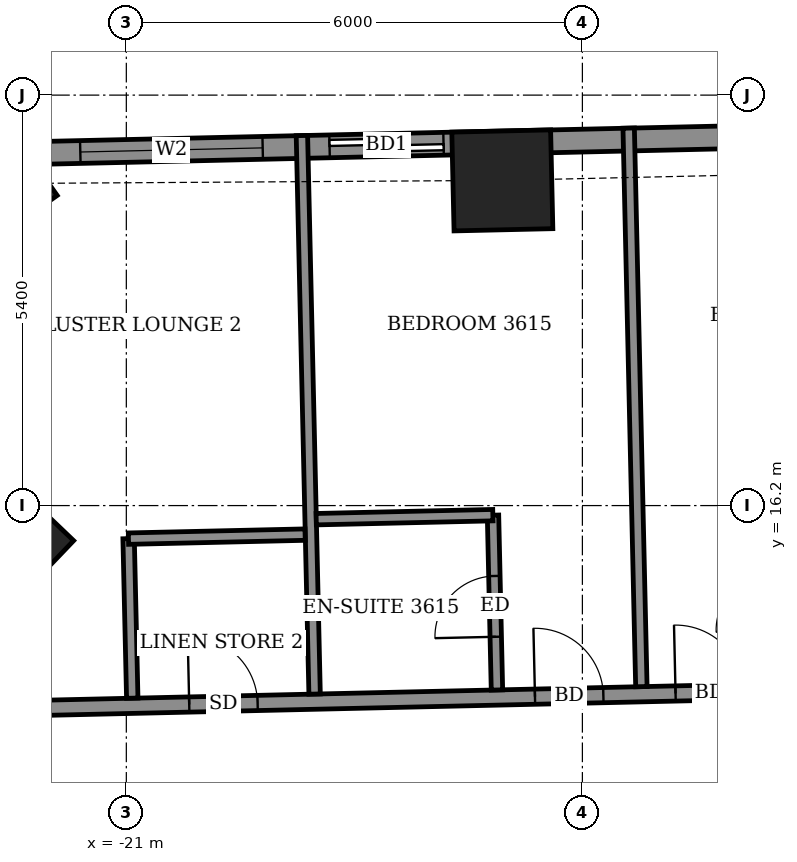
"""IFC4 building model, lengths in metres.
Left out: names, types, materials, properties, quantities, classifications, styles, units other than length and angle.
Written with IfcOpenShell. Run it as: python <this file> out.ifc"""

import sys

from ifc_helpers import new_model, si_unit, direction, frame, frame_2d, origin, origin_2d, place, context, subcontext, project, spatial, rectangle, extrude, element, fill, save


model = new_model("IFC4")
c1 = context("Model", 3, precision=1e-05, world=origin(), true_north=direction((0.0, 1.0)))
c2 = subcontext(c1, "Body", "Model", "MODEL_VIEW")
j1 = project(units=[si_unit("LENGTHUNIT", "METRE"), si_unit("PLANEANGLEUNIT", "RADIAN")], contexts=[c1])
p1 = place(None, origin())
s1 = spatial("IfcSite", under=j1, at=p1, CompositionType="ELEMENT")
p2 = place(p1, origin())
s2 = spatial("IfcBuilding", under=s1, at=p2, CompositionType="ELEMENT")
p3 = place(p2, frame((0.0, 0.0, 144.5)))
s3 = spatial("IfcBuildingStorey", under=s2, at=p3, CompositionType="ELEMENT", Elevation=144.5)
for number, where, z_axis, x_axis in (
    (1, (-16.053, 20.478, -0.55), (0.0, 0.0, 1.0), (-1.0, -0.023, 0.0)),
    (2, (-22.816, 20.435, -0.55), (0.0, 0.0, 1.0), (-0.816, -0.577, 0.0)),
    (3, (-22.612, 15.718, -0.55), (0.0, 0.0, 1.0), (-0.691, -0.723, 0.0)),
):
    element("IfcColumn", number, at=place(p3, frame(where, z_axis=z_axis, x_axis=x_axis)), inside=s3, PredefinedType="COLUMN", context=c2, shape_type="SweptSolid", body=[
        extrude(rectangle(XDim=1.3, YDim=1.3, at=origin_2d()), origin(), (0.0, 0.0, 1.0), 3.6),
    ])
p4 = place(p3, frame((19.396, 21.782, 0.0), z_axis=(0.0, 0.0, 1.0), x_axis=(-0.999742636707, -0.022686126826, 0.0)))
e4 = element("IfcWall", 4, at=p4, inside=s3, PredefinedType="SOLIDWALL", context=c2, shape_type="SweptSolid", body=[
    extrude(rectangle(XDim=42.444, YDim=0.3, at=frame_2d((21.222, 0.0))), origin(), (0.0, 0.0, 1.0), 3.05),
])
p5 = place(p4, frame((1.757, 0.0, 0.0)))
e5 = element("IfcOpeningElement", 5, at=p5, cuts=e4, PredefinedType="OPENING", context=c2, shape_type="SweptSolid", body=[
    extrude(rectangle(XDim=1.5, YDim=2.4, at=frame_2d((0.75, 1.2))), frame((0.0, 0.16, 0.0), z_axis=(0.0, -1.0, 0.0), x_axis=(1.0, 0.0, 0.0)), (0.0, 0.0, 1.0), 0.32),
])
p6 = place(p4, frame((4.634, 0.0, 0.0)))
e6 = element("IfcOpeningElement", 6, at=p6, cuts=e4, PredefinedType="OPENING", context=c2, shape_type="SweptSolid", body=[
    extrude(rectangle(XDim=1.5, YDim=2.4, at=frame_2d((0.75, 1.2))), frame((0.0, 0.16, 0.0), z_axis=(0.0, -1.0, 0.0), x_axis=(1.0, 0.0, 0.0)), (0.0, 0.0, 1.0), 0.32),
])
p7 = place(p4, frame((9.769, 0.0, 0.0)))
e7 = element("IfcOpeningElement", 7, at=p7, cuts=e4, PredefinedType="OPENING", context=c2, shape_type="SweptSolid", body=[
    extrude(rectangle(XDim=1.5, YDim=2.4, at=frame_2d((0.75, 1.2))), frame((0.0, 0.16, 0.0), z_axis=(0.0, -1.0, 0.0), x_axis=(1.0, 0.0, 0.0)), (0.0, 0.0, 1.0), 0.32),
])
p8 = place(p4, frame((14.946, 0.0, 0.0)))
e8 = element("IfcOpeningElement", 8, at=p8, cuts=e4, PredefinedType="OPENING", context=c2, shape_type="SweptSolid", body=[
    extrude(rectangle(XDim=1.5, YDim=2.4, at=frame_2d((0.75, 1.2))), frame((0.0, 0.16, 0.0), z_axis=(0.0, -1.0, 0.0), x_axis=(1.0, 0.0, 0.0)), (0.0, 0.0, 1.0), 0.32),
])
p9 = place(p4, frame((18.108, 0.0, 0.0)))
e9 = element("IfcOpeningElement", 9, at=p9, cuts=e4, PredefinedType="OPENING", context=c2, shape_type="SweptSolid", body=[
    extrude(rectangle(XDim=1.5, YDim=2.4, at=frame_2d((0.75, 1.2))), frame((0.0, 0.16, 0.0), z_axis=(0.0, -1.0, 0.0), x_axis=(1.0, 0.0, 0.0)), (0.0, 0.0, 1.0), 0.32),
])
p10 = place(p4, frame((22.733, 0.0, 0.0)))
e10 = element("IfcOpeningElement", 10, at=p10, cuts=e4, PredefinedType="OPENING", context=c2, shape_type="SweptSolid", body=[
    extrude(rectangle(XDim=1.5, YDim=2.4, at=frame_2d((0.75, 1.2))), frame((0.0, 0.16, 0.0), z_axis=(0.0, -1.0, 0.0), x_axis=(1.0, 0.0, 0.0)), (0.0, 0.0, 1.0), 0.32),
])
p11 = place(p4, frame((25.895, 0.0, 0.0)))
e11 = element("IfcOpeningElement", 11, at=p11, cuts=e4, PredefinedType="OPENING", context=c2, shape_type="SweptSolid", body=[
    extrude(rectangle(XDim=1.5, YDim=2.4, at=frame_2d((0.75, 1.2))), frame((0.0, 0.16, 0.0), z_axis=(0.0, -1.0, 0.0), x_axis=(1.0, 0.0, 0.0)), (0.0, 0.0, 1.0), 0.32),
])
p12 = place(p4, frame((30.944, 0.0, 0.0)))
e12 = element("IfcOpeningElement", 12, at=p12, cuts=e4, PredefinedType="OPENING", context=c2, shape_type="SweptSolid", body=[
    extrude(rectangle(XDim=1.5, YDim=2.4, at=frame_2d((0.75, 1.2))), frame((0.0, 0.16, 0.0), z_axis=(0.0, -1.0, 0.0), x_axis=(1.0, 0.0, 0.0)), (0.0, 0.0, 1.0), 0.32),
])
p13 = place(p4, frame((36.232, 0.0, 0.0)))
e13 = element("IfcOpeningElement", 13, at=p13, cuts=e4, PredefinedType="OPENING", context=c2, shape_type="SweptSolid", body=[
    extrude(rectangle(XDim=1.5, YDim=2.4, at=frame_2d((0.75, 1.2))), frame((0.0, 0.16, 0.0), z_axis=(0.0, -1.0, 0.0), x_axis=(1.0, 0.0, 0.0)), (0.0, 0.0, 1.0), 0.32),
])
p14 = place(p4, frame((38.612, 0.0, 0.9)))
e14 = element("IfcOpeningElement", 14, at=p14, cuts=e4, PredefinedType="OPENING", context=c2, shape_type="SweptSolid", body=[
    extrude(rectangle(XDim=2.4, YDim=1.5, at=frame_2d((1.2, 0.75))), frame((0.0, 0.16, 0.0), z_axis=(0.0, -1.0, 0.0), x_axis=(1.0, 0.0, 0.0)), (0.0, 0.0, 1.0), 0.32),
])
p15 = place(p3, frame((-26.421, 13.441, 0.0), z_axis=(0.0, 0.0, 1.0), x_axis=(0.999742754064, 0.022680954485, 0.0)))
e15 = element("IfcWall", 15, at=p15, inside=s3, PredefinedType="PARTITIONING", context=c2, shape_type="SweptSolid", body=[
    extrude(rectangle(XDim=48.945, YDim=0.2, at=frame_2d((24.472, 0.0))), origin(), (0.0, 0.0, 1.0), 3.05),
])
p16 = place(p15, frame((46.772, 0.0, 0.0)))
e16 = element("IfcOpeningElement", 16, at=p16, cuts=e15, PredefinedType="OPENING", context=c2, shape_type="SweptSolid", body=[
    extrude(rectangle(XDim=1.0, YDim=2.1, at=frame_2d((0.5, 1.05))), frame((0.0, 0.11, 0.0), z_axis=(0.0, -1.0, 0.0), x_axis=(1.0, 0.0, 0.0)), (0.0, 0.0, 1.0), 0.22),
])
p17 = place(p15, frame((42.55, 0.0, 0.0)))
e17 = element("IfcOpeningElement", 17, at=p17, cuts=e15, PredefinedType="OPENING", context=c2, shape_type="SweptSolid", body=[
    extrude(rectangle(XDim=0.9, YDim=2.1, at=frame_2d((0.45, 1.05))), frame((0.0, 0.11, 0.0), z_axis=(0.0, -1.0, 0.0), x_axis=(1.0, 0.0, 0.0)), (0.0, 0.0, 1.0), 0.22),
])
p18 = place(p15, frame((38.05, 0.0, 0.0)))
e18 = element("IfcOpeningElement", 18, at=p18, cuts=e15, PredefinedType="OPENING", context=c2, shape_type="SweptSolid", body=[
    extrude(rectangle(XDim=0.9, YDim=2.1, at=frame_2d((0.45, 1.05))), frame((0.0, 0.11, 0.0), z_axis=(0.0, -1.0, 0.0), x_axis=(1.0, 0.0, 0.0)), (0.0, 0.0, 1.0), 0.22),
])
p19 = place(p15, frame((36.225, 0.0, 0.0)))
e19 = element("IfcOpeningElement", 19, at=p19, cuts=e15, PredefinedType="OPENING", context=c2, shape_type="SweptSolid", body=[
    extrude(rectangle(XDim=0.9, YDim=2.1, at=frame_2d((0.45, 1.05))), frame((0.0, 0.11, 0.0), z_axis=(0.0, -1.0, 0.0), x_axis=(1.0, 0.0, 0.0)), (0.0, 0.0, 1.0), 0.22),
])
p20 = place(p15, frame((29.575, 0.0, 0.0)))
e20 = element("IfcOpeningElement", 20, at=p20, cuts=e15, PredefinedType="OPENING", context=c2, shape_type="SweptSolid", body=[
    extrude(rectangle(XDim=0.9, YDim=2.1, at=frame_2d((0.45, 1.05))), frame((0.0, 0.11, 0.0), z_axis=(0.0, -1.0, 0.0), x_axis=(1.0, 0.0, 0.0)), (0.0, 0.0, 1.0), 0.22),
])
p21 = place(p15, frame((27.75, 0.0, 0.0)))
e21 = element("IfcOpeningElement", 21, at=p21, cuts=e15, PredefinedType="OPENING", context=c2, shape_type="SweptSolid", body=[
    extrude(rectangle(XDim=0.9, YDim=2.1, at=frame_2d((0.45, 1.05))), frame((0.0, 0.11, 0.0), z_axis=(0.0, -1.0, 0.0), x_axis=(1.0, 0.0, 0.0)), (0.0, 0.0, 1.0), 0.22),
])
p22 = place(p15, frame((21.125, 0.0, 0.0)))
e22 = element("IfcOpeningElement", 22, at=p22, cuts=e15, PredefinedType="OPENING", context=c2, shape_type="SweptSolid", body=[
    extrude(rectangle(XDim=0.9, YDim=2.1, at=frame_2d((0.45, 1.05))), frame((0.0, 0.11, 0.0), z_axis=(0.0, -1.0, 0.0), x_axis=(1.0, 0.0, 0.0)), (0.0, 0.0, 1.0), 0.22),
])
p23 = place(p15, frame((19.275, 0.0, 0.0)))
e23 = element("IfcOpeningElement", 23, at=p23, cuts=e15, PredefinedType="OPENING", context=c2, shape_type="SweptSolid", body=[
    extrude(rectangle(XDim=0.9, YDim=2.1, at=frame_2d((0.45, 1.05))), frame((0.0, 0.11, 0.0), z_axis=(0.0, -1.0, 0.0), x_axis=(1.0, 0.0, 0.0)), (0.0, 0.0, 1.0), 0.22),
])
p24 = place(p15, frame((12.65, 0.0, 0.0)))
e24 = element("IfcOpeningElement", 24, at=p24, cuts=e15, PredefinedType="OPENING", context=c2, shape_type="SweptSolid", body=[
    extrude(rectangle(XDim=0.9, YDim=2.1, at=frame_2d((0.45, 1.05))), frame((0.0, 0.11, 0.0), z_axis=(0.0, -1.0, 0.0), x_axis=(1.0, 0.0, 0.0)), (0.0, 0.0, 1.0), 0.22),
])
p25 = place(p15, frame((10.8, 0.0, 0.0)))
e25 = element("IfcOpeningElement", 25, at=p25, cuts=e15, PredefinedType="OPENING", context=c2, shape_type="SweptSolid", body=[
    extrude(rectangle(XDim=0.9, YDim=2.1, at=frame_2d((0.45, 1.05))), frame((0.0, 0.11, 0.0), z_axis=(0.0, -1.0, 0.0), x_axis=(1.0, 0.0, 0.0)), (0.0, 0.0, 1.0), 0.22),
])
p26 = place(p15, frame((1.55, 0.0, 0.0)))
e26 = element("IfcOpeningElement", 26, at=p26, cuts=e15, PredefinedType="OPENING", context=c2, shape_type="SweptSolid", body=[
    extrude(rectangle(XDim=1.0, YDim=2.1, at=frame_2d((0.5, 1.05))), frame((0.0, 0.11, 0.0), z_axis=(0.0, -1.0, 0.0), x_axis=(1.0, 0.0, 0.0)), (0.0, 0.0, 1.0), 0.22),
])
p27 = place(p15, frame((6.25, 0.0, 0.0)))
e27 = element("IfcOpeningElement", 27, at=p27, cuts=e15, PredefinedType="OPENING", context=c2, shape_type="SweptSolid", body=[
    extrude(rectangle(XDim=0.9, YDim=2.1, at=frame_2d((0.45, 1.05))), frame((0.0, 0.11, 0.0), z_axis=(0.0, -1.0, 0.0), x_axis=(1.0, 0.0, 0.0)), (0.0, 0.0, 1.0), 0.22),
])
p28 = place(p3, frame((-20.922, 13.666, 0.0), z_axis=(0.0, 0.0, 1.0), x_axis=(-0.022792727877, 0.999740212033, 0.0)))
e28 = element("IfcWall", 28, at=p28, inside=s3, PredefinedType="PARTITIONING", context=c2, shape_type="SweptSolid", body=[
    extrude(rectangle(XDim=2.099, YDim=0.15, at=frame_2d((1.05, 0.0))), origin(), (0.0, 0.0, 1.0), 3.05),
])
p29 = place(p3, frame((-18.523, 13.72, 0.0), z_axis=(0.0, 0.0, 1.0), x_axis=(-0.022719896304, 0.99974186984, 0.0)))
e29 = element("IfcWall", 29, at=p29, inside=s3, PredefinedType="PARTITIONING", context=c2, shape_type="SweptSolid", body=[
    extrude(rectangle(XDim=7.35, YDim=0.15, at=frame_2d((3.675, 0.0))), origin(), (0.0, 0.0, 1.0), 2.55),
])
p30 = place(p3, frame((-16.124, 13.774, 0.0), z_axis=(0.0, 0.0, 1.0), x_axis=(-0.022603288534, 0.999744513037, 0.0)))
e30 = element("IfcWall", 30, at=p30, inside=s3, PredefinedType="PARTITIONING", context=c2, shape_type="SweptSolid", body=[
    extrude(rectangle(XDim=2.301, YDim=0.15, at=frame_2d((1.15, 0.0))), origin(), (0.0, 0.0, 1.0), 3.05),
])
p31 = place(p30, frame((0.7, 0.0, 0.0)))
e31 = element("IfcOpeningElement", 31, at=p31, cuts=e30, PredefinedType="OPENING", context=c2, shape_type="SweptSolid", body=[
    extrude(rectangle(XDim=0.8, YDim=2.1, at=frame_2d((0.4, 1.05))), frame((0.0, 0.085, 0.0), z_axis=(0.0, -1.0, 0.0), x_axis=(1.0, 0.0, 0.0)), (0.0, 0.0, 1.0), 0.17),
])
p32 = place(p3, frame((-14.224, 13.818, 0.0), z_axis=(0.0, 0.0, 1.0), x_axis=(-0.022720650804, 0.999741852694, 0.0)))
e32 = element("IfcWall", 32, at=p32, inside=s3, PredefinedType="PARTITIONING", context=c2, shape_type="SweptSolid", body=[
    extrude(rectangle(XDim=7.35, YDim=0.15, at=frame_2d((3.675, 0.0))), origin(), (0.0, 0.0, 1.0), 2.55),
])
for number, where, z_axis, x_axis in (
    (33, (-20.972, 15.765, 0.0), (0.0, 0.0, 1.0), (1.0, 0.023, 0.0)),
    (34, (-18.502, 16.021, 0.0), (0.0, 0.0, 1.0), (1.0, 0.023, 0.0)),
):
    element("IfcWall", number, at=place(p3, frame(where, z_axis=z_axis, x_axis=x_axis)), inside=s3, PredefinedType="PARTITIONING", context=c2, shape_type="SweptSolid", body=[
        extrude(rectangle(XDim=2.324, YDim=0.15, at=frame_2d((1.162, 0.0))), origin(), (0.0, 0.0, 1.0), 3.05),
    ])
p33 = place(p13, origin())
e35 = element("IfcDoor", 35, at=p33, inside=s3, OperationType="SLIDING_TO_LEFT", PredefinedType="DOOR", context=c2, shape_type="SweptSolid", body=[
    extrude(rectangle(XDim=1.5, YDim=2.4, at=frame_2d((0.75, 1.2))), frame((0.0, 0.025, 0.0), z_axis=(0.0, -1.0, 0.0), x_axis=(1.0, 0.0, 0.0)), (0.0, 0.0, 1.0), 0.05),
])
fill(e13, e35)
p34 = place(p14, origin())
e36 = element("IfcWindow", 36, at=p34, inside=s3, PartitioningType="DOUBLE_PANEL_VERTICAL", PredefinedType="WINDOW", context=c2, shape_type="SweptSolid", body=[
    extrude(rectangle(XDim=2.4, YDim=1.5, at=frame_2d((1.2, 0.75))), frame((0.0, 0.03, 0.0), z_axis=(0.0, -1.0, 0.0), x_axis=(1.0, 0.0, 0.0)), (0.0, 0.0, 1.0), 0.06),
])
fill(e14, e36)
p35 = place(p24, origin())
e37 = element("IfcDoor", 37, at=p35, inside=s3, OperationType="SINGLE_SWING_RIGHT", PredefinedType="DOOR", context=c2, shape_type="SweptSolid", body=[
    extrude(rectangle(XDim=0.9, YDim=2.1, at=frame_2d((0.45, 1.05))), frame((0.0, 0.025, 0.0), z_axis=(0.0, -1.0, 0.0), x_axis=(1.0, 0.0, 0.0)), (0.0, 0.0, 1.0), 0.05),
])
fill(e24, e37)
p36 = place(p25, origin())
e38 = element("IfcDoor", 38, at=p36, inside=s3, OperationType="SINGLE_SWING_LEFT", PredefinedType="DOOR", context=c2, shape_type="SweptSolid", body=[
    extrude(rectangle(XDim=0.9, YDim=2.1, at=frame_2d((0.45, 1.05))), frame((0.0, 0.025, 0.0), z_axis=(0.0, -1.0, 0.0), x_axis=(1.0, 0.0, 0.0)), (0.0, 0.0, 1.0), 0.05),
])
fill(e25, e38)
p37 = place(p31, origin())
e39 = element("IfcDoor", 39, at=p37, inside=s3, OperationType="SINGLE_SWING_LEFT", PredefinedType="DOOR", context=c2, shape_type="SweptSolid", body=[
    extrude(rectangle(XDim=0.8, YDim=2.1, at=frame_2d((0.4, 1.05))), frame((0.0, 0.025, 0.0), z_axis=(0.0, -1.0, 0.0), x_axis=(1.0, 0.0, 0.0)), (0.0, 0.0, 1.0), 0.05),
])
fill(e31, e39)
p38 = place(p27, origin())
e40 = element("IfcDoor", 40, at=p38, inside=s3, OperationType="SINGLE_SWING_RIGHT", PredefinedType="DOOR", context=c2, shape_type="SweptSolid", body=[
    extrude(rectangle(XDim=0.9, YDim=2.1, at=frame_2d((0.45, 1.05))), frame((0.0, 0.025, 0.0), z_axis=(0.0, -1.0, 0.0), x_axis=(1.0, 0.0, 0.0)), (0.0, 0.0, 1.0), 0.05),
])
fill(e27, e40)
save(model, sys.argv[1])
